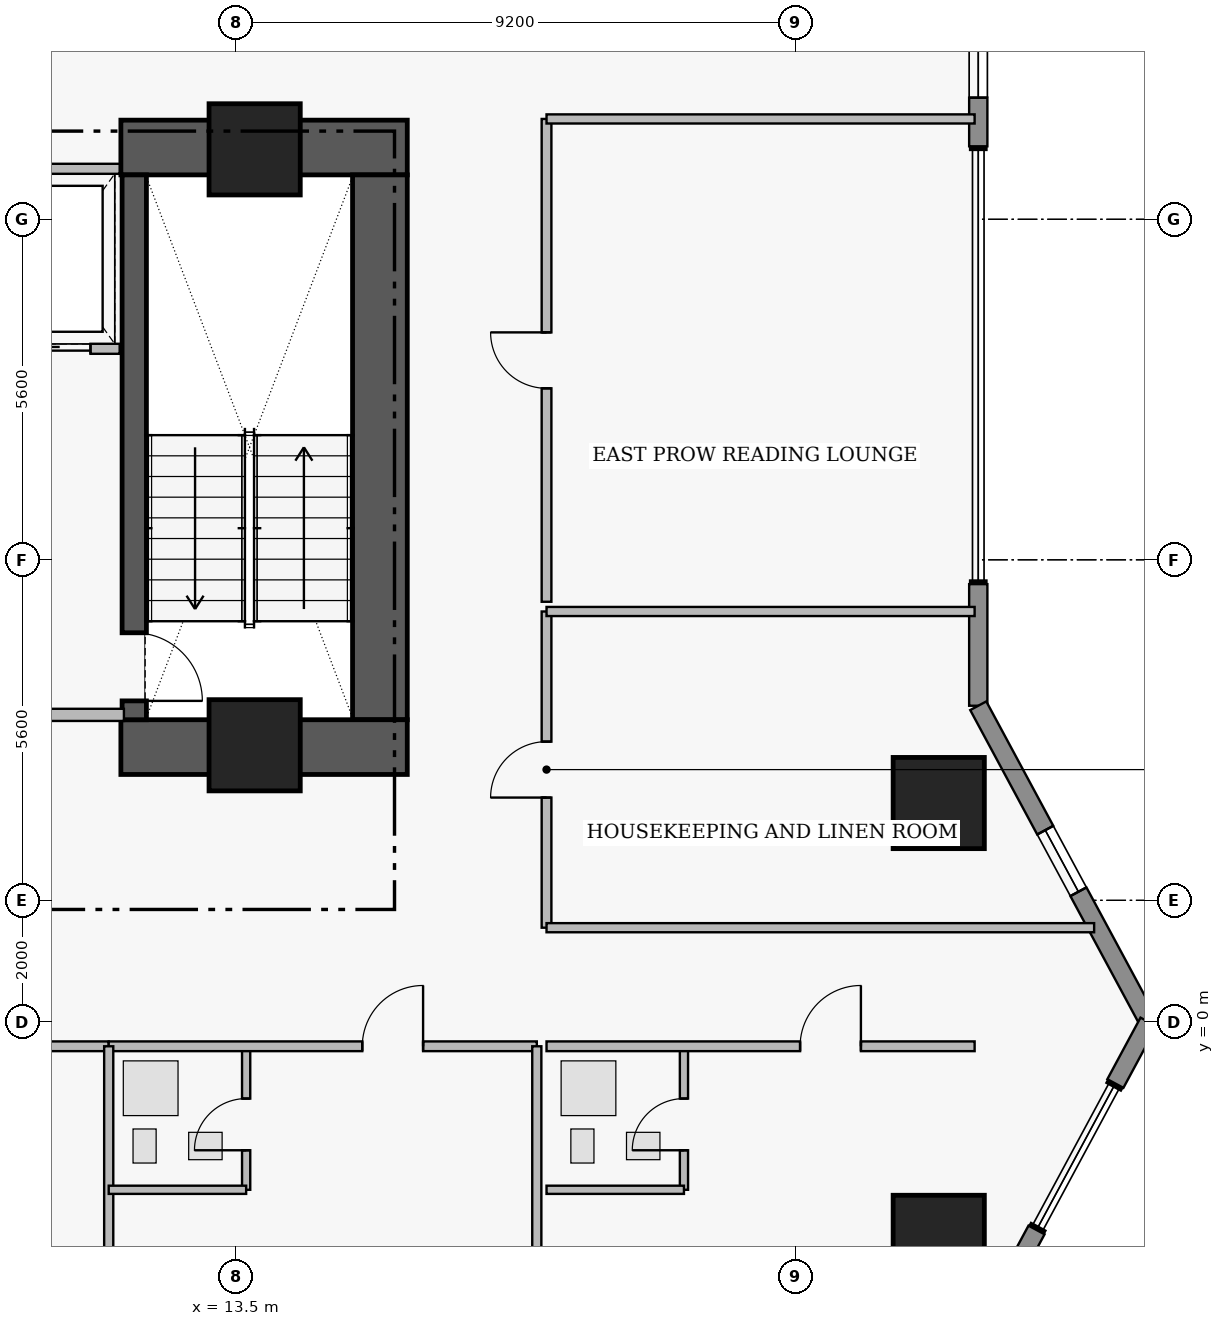
"""IFC4 building model, lengths in metres.
Left out: names, types, materials, properties, quantities, classifications, styles, units other than length and angle.
Written with IfcOpenShell. Run it as: python <this file> out.ifc"""

import sys

from ifc_helpers import new_model, si_unit, direction, frame, frame_2d, origin, origin_2d, place, context, subcontext, project, spatial, rectangle, extrude, element, fill, save


model = new_model("IFC4")
c1 = context("Model", 3, precision=1e-05, world=origin(), true_north=direction((0.0, 1.0)))
c2 = subcontext(c1, "Body", "Model", "MODEL_VIEW")
j1 = project(units=[si_unit("LENGTHUNIT", "METRE"), si_unit("PLANEANGLEUNIT", "RADIAN")], contexts=[c1])
p1 = place(None, origin())
s1 = spatial("IfcSite", under=j1, at=p1, CompositionType="ELEMENT")
p2 = place(p1, origin())
s2 = spatial("IfcBuilding", under=s1, at=p2, CompositionType="ELEMENT")
p3 = place(p2, frame((0.0, 0.0, 71.4)))
s3 = spatial("IfcBuildingStorey", under=s2, at=p3, CompositionType="ELEMENT", Elevation=71.4)
p4 = place(p3, frame((11.6, 14.38, 0.0), z_axis=(0.0, 0.0, 1.0), x_axis=(1.0, 0.0, 0.0)))
e1 = element("IfcWall", 1, at=p4, inside=s3, PredefinedType="SHEAR", context=c2, shape_type="SweptSolid", body=[
    extrude(rectangle(XDim=4.71, YDim=0.9, at=frame_2d((2.355, 0.0))), origin(), (0.0, 0.0, 1.0), 3.46),
])
p5 = place(p3, frame((15.86, 4.97, 0.0), z_axis=(0.0, 0.0, 1.0), x_axis=(0.0, 1.0, 0.0)))
e2 = element("IfcWall", 2, at=p5, inside=s3, PredefinedType="SHEAR", context=c2, shape_type="SweptSolid", body=[
    extrude(rectangle(XDim=8.96, YDim=0.9, at=frame_2d((4.48, 0.0))), origin(), (0.0, 0.0, 1.0), 3.46),
])
p6 = place(p3, frame((11.6, 4.52, 0.0), z_axis=(0.0, 0.0, 1.0), x_axis=(1.0, 0.0, 0.0)))
e3 = element("IfcWall", 3, at=p6, inside=s3, PredefinedType="SHEAR", context=c2, shape_type="SweptSolid", body=[
    extrude(rectangle(XDim=4.71, YDim=0.9, at=frame_2d((2.355, 0.0))), origin(), (0.0, 0.0, 1.0), 3.46),
])
p7 = place(p3, frame((11.82, 13.93, 0.0), z_axis=(0.0, 0.0, 1.0), x_axis=(0.0, -1.0, 0.0)))
e4 = element("IfcWall", 4, at=p7, inside=s3, PredefinedType="SHEAR", context=c2, shape_type="SweptSolid", body=[
    extrude(rectangle(XDim=8.96, YDim=0.4, at=frame_2d((4.48, 0.0))), origin(), (0.0, 0.0, 1.0), 3.46),
])
p8 = place(p7, frame((7.53, 0.0, 0.0)))
e5 = element("IfcOpeningElement", 5, at=p8, cuts=e4, PredefinedType="OPENING", context=c2, shape_type="SweptSolid", body=[
    extrude(rectangle(XDim=1.12, YDim=2.22, at=frame_2d((0.56, 1.11))), frame((0.0, 0.21, 0.0), z_axis=(0.0, -1.0, 0.0), x_axis=(1.0, 0.0, 0.0)), (0.0, 0.0, 1.0), 0.42),
])
for number, where, z_axis, x_axis in (
    (6, (13.8, 14.35, 0.0), (0.0, 0.0, 1.0), (1.0, 0.0, 0.0)),
    (7, (13.8, 4.55, 0.0), (0.0, 0.0, 1.0), (1.0, 0.0, 0.0)),
    (8, (25.05, -3.6, 0.0), (0.0, 0.0, 1.0), (1.0, 0.0, 0.0)),
    (9, (25.05, 3.6, 0.0), (0.0, 0.0, 1.0), (1.0, 0.0, 0.0)),
):
    element("IfcColumn", number, at=place(p3, frame(where, z_axis=z_axis, x_axis=x_axis)), inside=s3, PredefinedType="COLUMN", context=c2, shape_type="SweptSolid", body=[
        extrude(rectangle(XDim=1.5, YDim=1.5, at=origin_2d()), origin(), (0.0, 0.0, 1.0), 3.65),
    ])
p9 = place(p3, frame((25.7, 19.5, 0.0), z_axis=(0.0, 0.0, 1.0), x_axis=(0.0, -1.0, 0.0)))
e10 = element("IfcWall", 10, at=p9, inside=s3, PredefinedType="STANDARD", context=c2, shape_type="SweptSolid", body=[
    extrude(rectangle(XDim=5.1, YDim=0.3, at=frame_2d((2.55, 0.0))), origin(), (0.0, 0.0, 1.0), 3.43),
])
p10 = place(p9, frame((0.66, 0.0, 0.85)))
e11 = element("IfcOpeningElement", 11, at=p10, cuts=e10, PredefinedType="OPENING", context=c2, shape_type="SweptSolid", body=[
    extrude(rectangle(XDim=1.6, YDim=1.8, at=frame_2d((0.8, 0.9))), frame((0.0, 0.16, 0.0), z_axis=(0.0, -1.0, 0.0), x_axis=(1.0, 0.0, 0.0)), (0.0, 0.0, 1.0), 0.32),
])
p11 = place(p9, frame((3.15, 0.0, 0.95)))
e12 = element("IfcOpeningElement", 12, at=p11, cuts=e10, PredefinedType="OPENING", context=c2, shape_type="SweptSolid", body=[
    extrude(rectangle(XDim=1.15, YDim=1.55, at=frame_2d((0.575, 0.775))), frame((0.0, 0.16, 0.0), z_axis=(0.0, -1.0, 0.0), x_axis=(1.0, 0.0, 0.0)), (0.0, 0.0, 1.0), 0.32),
])
p12 = place(p3, frame((25.7, 7.2, 0.0), z_axis=(0.0, 0.0, 1.0), x_axis=(0.0, -1.0, 0.0)))
e13 = element("IfcWall", 13, at=p12, inside=s3, PredefinedType="STANDARD", context=c2, shape_type="SweptSolid", body=[
    extrude(rectangle(XDim=2.0, YDim=0.3, at=frame_2d((1.0, 0.0))), origin(), (0.0, 0.0, 1.0), 3.43),
])
p13 = place(p3, frame((25.7, 5.2, 0.0), z_axis=(0.0, 0.0, 1.0), x_axis=(0.474109683532, -0.880465790352, 0.0)))
e14 = element("IfcWall", 14, at=p13, inside=s3, PredefinedType="STANDARD", context=c2, shape_type="SweptSolid", body=[
    extrude(rectangle(XDim=5.906, YDim=0.3, at=frame_2d((2.953, 0.0))), origin(), (0.0, 0.0, 1.0), 3.43),
])
p14 = place(p13, frame((2.324, 0.0, 0.95)))
e15 = element("IfcOpeningElement", 15, at=p14, cuts=e14, PredefinedType="OPENING", context=c2, shape_type="SweptSolid", body=[
    extrude(rectangle(XDim=1.15, YDim=1.55, at=frame_2d((0.575, 0.775))), frame((0.0, 0.16, 0.0), z_axis=(0.0, -1.0, 0.0), x_axis=(1.0, 0.0, 0.0)), (0.0, 0.0, 1.0), 0.32),
])
p15 = place(p3, frame((28.5, 0.0, 0.0), z_axis=(0.0, 0.0, 1.0), x_axis=(-0.474099823035, -0.880471099922, 0.0)))
e16 = element("IfcWall", 16, at=p15, inside=s3, PredefinedType="STANDARD", context=c2, shape_type="SweptSolid", body=[
    extrude(rectangle(XDim=1.15, YDim=0.3, at=frame_2d((0.575, 0.0))), origin(), (0.0, 0.0, 1.0), 3.43),
])
p16 = place(p3, frame((26.658, -3.421, 0.0), z_axis=(0.0, 0.0, 1.0), x_axis=(-0.474121438562, -0.88045946045, 0.0)))
e17 = element("IfcWall", 17, at=p16, inside=s3, PredefinedType="STANDARD", context=c2, shape_type="SweptSolid", body=[
    extrude(rectangle(XDim=2.021, YDim=0.3, at=frame_2d((1.01, 0.0))), origin(), (0.0, 0.0, 1.0), 3.43),
])
p17 = place(p3, frame((9.42, 11.07, 0.0), z_axis=(0.0, 0.0, 1.0), x_axis=(1.0, 0.0, 0.0)))
e18 = element("IfcWall", 18, at=p17, inside=s3, PredefinedType="PARTITIONING", context=c2, shape_type="SweptSolid", body=[
    extrude(rectangle(XDim=2.16, YDim=0.165, at=frame_2d((1.08, 0.0))), origin(), (0.0, 0.0, 1.0), 3.43),
])
p18 = place(p17, frame((0.53, 0.0, 0.0)))
e19 = element("IfcOpeningElement", 19, at=p18, cuts=e18, PredefinedType="OPENING", context=c2, shape_type="SweptSolid", body=[
    extrude(rectangle(XDim=1.15, YDim=2.25, at=frame_2d((0.575, 1.125))), frame((0.0, 0.093, 0.0), z_axis=(0.0, -1.0, 0.0), x_axis=(1.0, 0.0, 0.0)), (0.0, 0.0, 1.0), 0.185),
])
p19 = place(p3, frame((-11.4, -0.4, 0.0), z_axis=(0.0, 0.0, 1.0), x_axis=(1.0, 0.0, 0.0)))
e20 = element("IfcWall", 20, at=p19, inside=s3, PredefinedType="PARTITIONING", context=c2, shape_type="SweptSolid", body=[
    extrude(rectangle(XDim=22.8, YDim=0.16, at=frame_2d((11.4, 0.0))), origin(), (0.0, 0.0, 1.0), 3.43),
])
p20 = place(p19, frame((10.86, 0.0, 0.0)))
e21 = element("IfcOpeningElement", 21, at=p20, cuts=e20, PredefinedType="OPENING", context=c2, shape_type="SweptSolid", body=[
    extrude(rectangle(XDim=1.08, YDim=2.18, at=frame_2d((0.54, 1.09))), frame((0.0, 0.09, 0.0), z_axis=(0.0, -1.0, 0.0), x_axis=(1.0, 0.0, 0.0)), (0.0, 0.0, 1.0), 0.18),
])
p21 = place(p3, frame((13.66, -2.76, 0.0), z_axis=(0.0, 0.0, 1.0), x_axis=(0.0, 1.0, 0.0)))
e22 = element("IfcWall", 22, at=p21, inside=s3, PredefinedType="PLUMBINGWALL", context=c2, shape_type="SweptSolid", body=[
    extrude(rectangle(XDim=2.36, YDim=0.135, at=frame_2d((1.18, 0.0))), origin(), (0.0, 0.0, 1.0), 2.668),
])
p22 = place(p21, frame((0.65, 0.0, 0.0)))
e23 = element("IfcOpeningElement", 23, at=p22, cuts=e22, PredefinedType="OPENING", context=c2, shape_type="SweptSolid", body=[
    extrude(rectangle(XDim=0.85, YDim=2.1, at=frame_2d((0.425, 1.05))), frame((0.0, 0.077, 0.0), z_axis=(0.0, -1.0, 0.0), x_axis=(1.0, 0.0, 0.0)), (0.0, 0.0, 1.0), 0.155),
])
p23 = place(p3, frame((11.4, -0.4, 0.0), z_axis=(0.0, 0.0, 1.0), x_axis=(1.0, 0.0, 0.0)))
e24 = element("IfcWall", 24, at=p23, inside=s3, PredefinedType="PARTITIONING", context=c2, shape_type="SweptSolid", body=[
    extrude(rectangle(XDim=7.04, YDim=0.16, at=frame_2d((3.52, 0.0))), origin(), (0.0, 0.0, 1.0), 3.43),
])
p24 = place(p23, frame((4.17, 0.0, 0.0)))
e25 = element("IfcOpeningElement", 25, at=p24, cuts=e24, PredefinedType="OPENING", context=c2, shape_type="SweptSolid", body=[
    extrude(rectangle(XDim=1.0, YDim=2.15, at=frame_2d((0.5, 1.075))), frame((0.0, 0.09, 0.0), z_axis=(0.0, -1.0, 0.0), x_axis=(1.0, 0.0, 0.0)), (0.0, 0.0, 1.0), 0.18),
])
p25 = place(p3, frame((20.86, -2.76, 0.0), z_axis=(0.0, 0.0, 1.0), x_axis=(0.0, 1.0, 0.0)))
e26 = element("IfcWall", 26, at=p25, inside=s3, PredefinedType="PLUMBINGWALL", context=c2, shape_type="SweptSolid", body=[
    extrude(rectangle(XDim=2.36, YDim=0.135, at=frame_2d((1.18, 0.0))), origin(), (0.0, 0.0, 1.0), 3.43),
])
p26 = place(p25, frame((0.65, 0.0, 0.0)))
e27 = element("IfcOpeningElement", 27, at=p26, cuts=e26, PredefinedType="OPENING", context=c2, shape_type="SweptSolid", body=[
    extrude(rectangle(XDim=0.85, YDim=2.1, at=frame_2d((0.425, 1.05))), frame((0.0, 0.077, 0.0), z_axis=(0.0, -1.0, 0.0), x_axis=(1.0, 0.0, 0.0)), (0.0, 0.0, 1.0), 0.155),
])
p27 = place(p3, frame((18.6, -0.4, 0.0), z_axis=(0.0, 0.0, 1.0), x_axis=(1.0, 0.0, 0.0)))
e28 = element("IfcWall", 28, at=p27, inside=s3, PredefinedType="PARTITIONING", context=c2, shape_type="SweptSolid", body=[
    extrude(rectangle(XDim=7.04, YDim=0.16, at=frame_2d((3.52, 0.0))), origin(), (0.0, 0.0, 1.0), 3.43),
])
p28 = place(p27, frame((4.17, 0.0, 0.0)))
e29 = element("IfcOpeningElement", 29, at=p28, cuts=e28, PredefinedType="OPENING", context=c2, shape_type="SweptSolid", body=[
    extrude(rectangle(XDim=1.0, YDim=2.15, at=frame_2d((0.5, 1.075))), frame((0.0, 0.09, 0.0), z_axis=(0.0, -1.0, 0.0), x_axis=(1.0, 0.0, 0.0)), (0.0, 0.0, 1.0), 0.18),
])
p29 = place(p3, frame((18.6, 1.55, 0.0), z_axis=(0.0, 0.0, 1.0), x_axis=(0.0, 1.0, 0.0)))
e30 = element("IfcWall", 30, at=p29, inside=s3, PredefinedType="PARTITIONING", context=c2, shape_type="SweptSolid", body=[
    extrude(rectangle(XDim=5.2, YDim=0.16, at=frame_2d((2.6, 0.0))), origin(), (0.0, 0.0, 1.0), 3.43),
])
p30 = place(p29, frame((2.14, 0.0, 0.0)))
e31 = element("IfcOpeningElement", 31, at=p30, cuts=e30, PredefinedType="OPENING", context=c2, shape_type="SweptSolid", body=[
    extrude(rectangle(XDim=0.92, YDim=2.12, at=frame_2d((0.46, 1.06))), frame((0.0, 0.09, 0.0), z_axis=(0.0, -1.0, 0.0), x_axis=(1.0, 0.0, 0.0)), (0.0, 0.0, 1.0), 0.18),
])
p31 = place(p3, frame((18.6, 6.91, 0.0), z_axis=(0.0, 0.0, 1.0), x_axis=(0.0, 1.0, 0.0)))
e32 = element("IfcWall", 32, at=p31, inside=s3, PredefinedType="PARTITIONING", context=c2, shape_type="SweptSolid", body=[
    extrude(rectangle(XDim=7.94, YDim=0.16, at=frame_2d((3.97, 0.0))), origin(), (0.0, 0.0, 1.0), 3.43),
])
p32 = place(p31, frame((3.51, 0.0, 0.0)))
e33 = element("IfcOpeningElement", 33, at=p32, cuts=e32, PredefinedType="OPENING", context=c2, shape_type="SweptSolid", body=[
    extrude(rectangle(XDim=0.92, YDim=2.12, at=frame_2d((0.46, 1.06))), frame((0.0, 0.09, 0.0), z_axis=(0.0, -1.0, 0.0), x_axis=(1.0, 0.0, 0.0)), (0.0, 0.0, 1.0), 0.18),
])
p33 = place(p3, frame((8.8, 5.05, 0.0), z_axis=(0.0, 0.0, 1.0), x_axis=(1.0, 0.0, 0.0)))
e34 = element("IfcWall", 34, at=p33, inside=s3, PredefinedType="PARTITIONING", context=c2, shape_type="SweptSolid", body=[
    extrude(rectangle(XDim=2.85, YDim=0.2, at=frame_2d((1.425, 0.0))), origin(), (0.0, 0.0, 1.0), 3.43),
])
p34 = place(p3, frame((9.42, 14.03, 0.0), z_axis=(0.0, 0.0, 1.0), x_axis=(1.0, 0.0, 0.0)))
e35 = element("IfcWall", 35, at=p34, inside=s3, PredefinedType="PARTITIONING", context=c2, shape_type="SweptSolid", body=[
    extrude(rectangle(XDim=2.16, YDim=0.165, at=frame_2d((1.08, 0.0))), origin(), (0.0, 0.0, 1.0), 3.43),
])
p35 = place(p3, frame((11.4, -23.04, 0.0), z_axis=(0.0, 0.0, 1.0), x_axis=(0.0, 1.0, 0.0)))
e36 = element("IfcWall", 36, at=p35, inside=s3, PredefinedType="PARTITIONING", context=c2, shape_type="SweptSolid", body=[
    extrude(rectangle(XDim=22.64, YDim=0.15, at=frame_2d((11.32, 0.0))), origin(), (0.0, 0.0, 1.0), 3.43),
])
p36 = place(p3, frame((11.4, -2.76, 0.0), z_axis=(0.0, 0.0, 1.0), x_axis=(1.0, 0.0, 0.0)))
e37 = element("IfcWall", 37, at=p36, inside=s3, PredefinedType="PLUMBINGWALL", context=c2, shape_type="SweptSolid", body=[
    extrude(rectangle(XDim=2.26, YDim=0.135, at=frame_2d((1.13, 0.0))), origin(), (0.0, 0.0, 1.0), 3.43),
])
p37 = place(p3, frame((18.44, -23.02, 0.0), z_axis=(0.0, 0.0, 1.0), x_axis=(0.0, 1.0, 0.0)))
e38 = element("IfcWall", 38, at=p37, inside=s3, PredefinedType="PARTITIONING", context=c2, shape_type="SweptSolid", body=[
    extrude(rectangle(XDim=22.62, YDim=0.15, at=frame_2d((11.31, 0.0))), origin(), (0.0, 0.0, 1.0), 3.43),
])
p38 = place(p3, frame((18.6, -2.76, 0.0), z_axis=(0.0, 0.0, 1.0), x_axis=(1.0, 0.0, 0.0)))
e39 = element("IfcWall", 39, at=p38, inside=s3, PredefinedType="PLUMBINGWALL", context=c2, shape_type="SweptSolid", body=[
    extrude(rectangle(XDim=2.26, YDim=0.135, at=frame_2d((1.13, 0.0))), origin(), (0.0, 0.0, 1.0), 3.43),
])
p39 = place(p3, frame((18.6, 1.55, 0.0), z_axis=(0.0, 0.0, 1.0), x_axis=(1.0, 0.0, 0.0)))
e40 = element("IfcWall", 40, at=p39, inside=s3, PredefinedType="PARTITIONING", context=c2, shape_type="SweptSolid", body=[
    extrude(rectangle(XDim=9.005, YDim=0.15, at=frame_2d((4.503, 0.0))), origin(), (0.0, 0.0, 1.0), 3.43),
])
for number, where, z_axis, x_axis in (
    (41, (18.6, 6.75, 0.0), (0.0, 0.0, 1.0), (1.0, 0.0, 0.0)),
    (42, (18.6, 14.85, 0.0), (0.0, 0.0, 1.0), (1.0, 0.0, 0.0)),
):
    element("IfcWall", number, at=place(p3, frame(where, z_axis=z_axis, x_axis=x_axis)), inside=s3, PredefinedType="PARTITIONING", context=c2, shape_type="SweptSolid", body=[
        extrude(rectangle(XDim=7.04, YDim=0.15, at=frame_2d((3.52, 0.0))), origin(), (0.0, 0.0, 1.0), 3.43),
    ])
p40 = place(p11, origin())
e43 = element("IfcWindow", 43, at=p40, inside=s3, PartitioningType="SINGLE_PANEL", PredefinedType="WINDOW", context=c2, shape_type="SweptSolid", body=[
    extrude(rectangle(XDim=1.15, YDim=1.55, at=frame_2d((0.575, 0.775))), frame((0.0, 0.03, 0.0), z_axis=(0.0, -1.0, 0.0), x_axis=(1.0, 0.0, 0.0)), (0.0, 0.0, 1.0), 0.06),
])
fill(e12, e43)
p41 = place(p14, origin())
e44 = element("IfcWindow", 44, at=p41, inside=s3, PartitioningType="SINGLE_PANEL", PredefinedType="WINDOW", context=c2, shape_type="SweptSolid", body=[
    extrude(rectangle(XDim=1.15, YDim=1.55, at=frame_2d((0.575, 0.775))), frame((0.0, 0.03, 0.0), z_axis=(0.0, -1.0, 0.0), x_axis=(1.0, 0.0, 0.0)), (0.0, 0.0, 1.0), 0.06),
])
fill(e15, e44)
p42 = place(p8, origin())
e45 = element("IfcDoor", 45, at=p42, inside=s3, OperationType="SINGLE_SWING_RIGHT", PredefinedType="DOOR", context=c2, shape_type="SweptSolid", body=[
    extrude(rectangle(XDim=1.12, YDim=2.22, at=frame_2d((0.56, 1.11))), frame((0.0, 0.025, 0.0), z_axis=(0.0, -1.0, 0.0), x_axis=(1.0, 0.0, 0.0)), (0.0, 0.0, 1.0), 0.05),
])
fill(e5, e45)
p43 = place(p18, origin())
e46 = element("IfcDoor", 46, at=p43, inside=s3, OperationType="SLIDING_TO_LEFT", PredefinedType="DOOR", context=c2, shape_type="SweptSolid", body=[
    extrude(rectangle(XDim=1.15, YDim=2.25, at=frame_2d((0.575, 1.125))), frame((0.0, 0.025, 0.0), z_axis=(0.0, -1.0, 0.0), x_axis=(1.0, 0.0, 0.0)), (0.0, 0.0, 1.0), 0.05),
])
fill(e19, e46)
p44 = place(p22, origin())
e47 = element("IfcDoor", 47, at=p44, inside=s3, OperationType="SINGLE_SWING_LEFT", PredefinedType="DOOR", context=c2, shape_type="SweptSolid", body=[
    extrude(rectangle(XDim=0.85, YDim=2.1, at=frame_2d((0.425, 1.05))), frame((0.0, 0.025, 0.0), z_axis=(0.0, -1.0, 0.0), x_axis=(1.0, 0.0, 0.0)), (0.0, 0.0, 1.0), 0.05),
])
fill(e23, e47)
p45 = place(p24, origin())
e48 = element("IfcDoor", 48, at=p45, inside=s3, OperationType="SINGLE_SWING_RIGHT", PredefinedType="DOOR", context=c2, shape_type="SweptSolid", body=[
    extrude(rectangle(XDim=1.0, YDim=2.15, at=frame_2d((0.5, 1.075))), frame((0.0, 0.025, 0.0), z_axis=(0.0, -1.0, 0.0), x_axis=(1.0, 0.0, 0.0)), (0.0, 0.0, 1.0), 0.05),
])
fill(e25, e48)
p46 = place(p26, origin())
e49 = element("IfcDoor", 49, at=p46, inside=s3, OperationType="SINGLE_SWING_LEFT", PredefinedType="DOOR", context=c2, shape_type="SweptSolid", body=[
    extrude(rectangle(XDim=0.85, YDim=2.1, at=frame_2d((0.425, 1.05))), frame((0.0, 0.025, 0.0), z_axis=(0.0, -1.0, 0.0), x_axis=(1.0, 0.0, 0.0)), (0.0, 0.0, 1.0), 0.05),
])
fill(e27, e49)
p47 = place(p28, origin())
e50 = element("IfcDoor", 50, at=p47, inside=s3, OperationType="SINGLE_SWING_RIGHT", PredefinedType="DOOR", context=c2, shape_type="SweptSolid", body=[
    extrude(rectangle(XDim=1.0, YDim=2.15, at=frame_2d((0.5, 1.075))), frame((0.0, 0.025, 0.0), z_axis=(0.0, -1.0, 0.0), x_axis=(1.0, 0.0, 0.0)), (0.0, 0.0, 1.0), 0.05),
])
fill(e29, e50)
p48 = place(p30, origin())
e51 = element("IfcDoor", 51, at=p48, inside=s3, OperationType="SINGLE_SWING_LEFT", PredefinedType="DOOR", context=c2, shape_type="SweptSolid", body=[
    extrude(rectangle(XDim=0.92, YDim=2.12, at=frame_2d((0.46, 1.06))), frame((0.0, 0.025, 0.0), z_axis=(0.0, -1.0, 0.0), x_axis=(1.0, 0.0, 0.0)), (0.0, 0.0, 1.0), 0.05),
])
fill(e31, e51)
p49 = place(p32, origin())
e52 = element("IfcDoor", 52, at=p49, inside=s3, OperationType="SINGLE_SWING_RIGHT", PredefinedType="DOOR", context=c2, shape_type="SweptSolid", body=[
    extrude(rectangle(XDim=0.92, YDim=2.12, at=frame_2d((0.46, 1.06))), frame((0.0, 0.025, 0.0), z_axis=(0.0, -1.0, 0.0), x_axis=(1.0, 0.0, 0.0)), (0.0, 0.0, 1.0), 0.05),
])
fill(e33, e52)
save(model, sys.argv[1])
